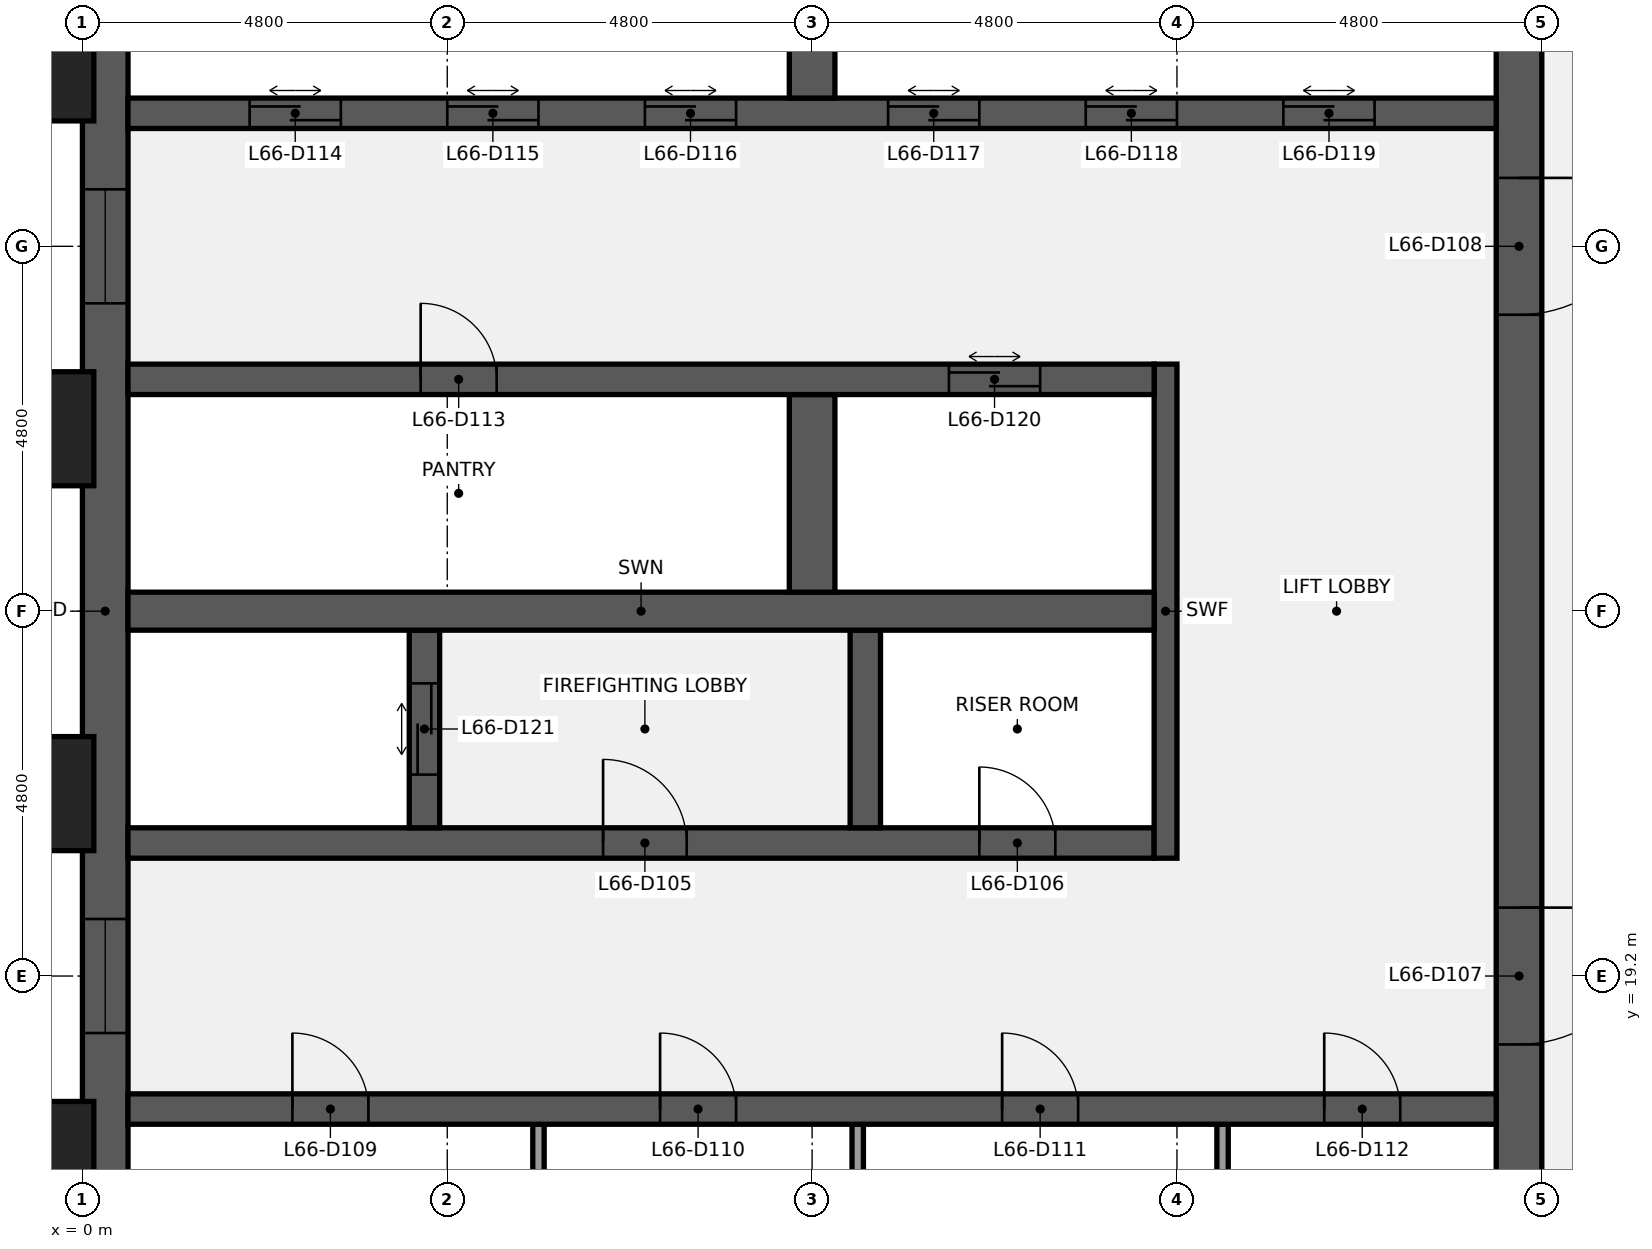
"""IFC4 building model, lengths in metres.
Left out: names, types, materials, properties, quantities, classifications, styles, units other than length and angle.
Written with IfcOpenShell. Run it as: python <this file> out.ifc"""

import sys

from ifc_helpers import new_model, si_unit, direction, frame, frame_2d, origin, origin_2d, place, context, subcontext, project, spatial, rectangle, extrude, element, fill, save


model = new_model("IFC4")
c1 = context("Model", 3, precision=1e-05, world=origin(), true_north=direction((0.0, 1.0)))
c2 = subcontext(c1, "Body", "Model", "MODEL_VIEW")
j1 = project(units=[si_unit("LENGTHUNIT", "METRE"), si_unit("PLANEANGLEUNIT", "RADIAN")], contexts=[c1])
p1 = place(None, origin())
s1 = spatial("IfcSite", under=j1, at=p1, CompositionType="ELEMENT")
p2 = place(p1, origin())
s2 = spatial("IfcBuilding", under=s1, at=p2, CompositionType="ELEMENT")
p3 = place(p2, frame((0.0, 0.0, 302.3)))
s3 = spatial("IfcBuildingStorey", under=s2, at=p3, CompositionType="ELEMENT", Elevation=302.3)
p4 = place(p3, frame((0.3, 9.6, 0.0), z_axis=(0.0, 0.0, 1.0), x_axis=(0.0, 1.0, 0.0)))
e1 = element("IfcWall", 1, at=p4, inside=s3, PredefinedType="SHEAR", context=c2, shape_type="SweptSolid", body=[
    extrude(rectangle(XDim=28.8, YDim=0.6, at=frame_2d((14.4, 0.0))), origin(), (0.0, 0.0, 1.0), 3.84),
])
p5 = place(p4, frame((8.85, 0.0, 0.9)))
e2 = element("IfcOpeningElement", 2, at=p5, cuts=e1, PredefinedType="OPENING", context=c2, shape_type="SweptSolid", body=[
    extrude(rectangle(XDim=1.5, YDim=1.5, at=frame_2d((0.75, 0.75))), frame((0.0, 0.31, 0.0), z_axis=(0.0, -1.0, 0.0), x_axis=(1.0, 0.0, 0.0)), (0.0, 0.0, 1.0), 0.62),
])
p6 = place(p4, frame((18.45, 0.0, 0.9)))
e3 = element("IfcOpeningElement", 3, at=p6, cuts=e1, PredefinedType="OPENING", context=c2, shape_type="SweptSolid", body=[
    extrude(rectangle(XDim=1.5, YDim=1.5, at=frame_2d((0.75, 0.75))), frame((0.0, 0.31, 0.0), z_axis=(0.0, -1.0, 0.0), x_axis=(1.0, 0.0, 0.0)), (0.0, 0.0, 1.0), 0.62),
])
p7 = place(p3, frame((18.9, 38.4, 0.0), z_axis=(0.0, 0.0, 1.0), x_axis=(0.0, -1.0, 0.0)))
e4 = element("IfcWall", 4, at=p7, inside=s3, PredefinedType="SHEAR", context=c2, shape_type="SweptSolid", body=[
    extrude(rectangle(XDim=28.8, YDim=0.6, at=frame_2d((14.4, 0.0))), origin(), (0.0, 0.0, 1.0), 3.84),
])
p8 = place(p7, frame((18.3, 0.0, 0.0)))
e5 = element("IfcOpeningElement", 5, at=p8, cuts=e4, PredefinedType="OPENING", context=c2, shape_type="SweptSolid", body=[
    extrude(rectangle(XDim=1.8, YDim=2.1, at=frame_2d((0.9, 1.05))), frame((0.0, 0.31, 0.0), z_axis=(0.0, -1.0, 0.0), x_axis=(1.0, 0.0, 0.0)), (0.0, 0.0, 1.0), 0.62),
])
p9 = place(p7, frame((8.7, 0.0, 0.0)))
e6 = element("IfcOpeningElement", 6, at=p9, cuts=e4, PredefinedType="OPENING", context=c2, shape_type="SweptSolid", body=[
    extrude(rectangle(XDim=1.8, YDim=2.1, at=frame_2d((0.9, 1.05))), frame((0.0, 0.31, 0.0), z_axis=(0.0, -1.0, 0.0), x_axis=(1.0, 0.0, 0.0)), (0.0, 0.0, 1.0), 0.62),
])
for number, where, z_axis, x_axis in (
    (7, (6.0, 14.65, 0.0), (0.0, 0.0, 1.0), (0.0, 1.0, 0.0)),
    (8, (10.2, 14.65, 0.0), (0.0, 0.0, 1.0), (0.0, 1.0, 0.0)),
    (9, (15.0, 14.65, 0.0), (0.0, 0.0, 1.0), (0.0, 1.0, 0.0)),
):
    element("IfcWall", number, at=place(p3, frame(where, z_axis=z_axis, x_axis=x_axis)), inside=s3, PredefinedType="PARTITIONING", context=c2, shape_type="SweptSolid", body=[
        extrude(rectangle(XDim=2.6, YDim=0.15, at=frame_2d((1.3, 0.0))), origin(), (0.0, 0.0, 1.0), 3.84),
    ])
p10 = place(p3, frame((0.6, 17.45, 0.0), z_axis=(0.0, 0.0, 1.0), x_axis=(1.0, 0.0, 0.0)))
e10 = element("IfcWall", 10, at=p10, inside=s3, PredefinedType="SHEAR", context=c2, shape_type="SweptSolid", body=[
    extrude(rectangle(XDim=18.0, YDim=0.4, at=frame_2d((9.0, 0.0))), origin(), (0.0, 0.0, 1.0), 3.84),
])
p11 = place(p10, frame((2.163, 0.0, 0.0)))
e11 = element("IfcOpeningElement", 11, at=p11, cuts=e10, PredefinedType="OPENING", context=c2, shape_type="SweptSolid", body=[
    extrude(rectangle(XDim=1.0, YDim=2.1, at=frame_2d((0.5, 1.05))), frame((0.0, 0.21, 0.0), z_axis=(0.0, -1.0, 0.0), x_axis=(1.0, 0.0, 0.0)), (0.0, 0.0, 1.0), 0.42),
])
p12 = place(p10, frame((7.0, 0.0, 0.0)))
e12 = element("IfcOpeningElement", 12, at=p12, cuts=e10, PredefinedType="OPENING", context=c2, shape_type="SweptSolid", body=[
    extrude(rectangle(XDim=1.0, YDim=2.1, at=frame_2d((0.5, 1.05))), frame((0.0, 0.21, 0.0), z_axis=(0.0, -1.0, 0.0), x_axis=(1.0, 0.0, 0.0)), (0.0, 0.0, 1.0), 0.42),
])
p13 = place(p10, frame((11.5, 0.0, 0.0)))
e13 = element("IfcOpeningElement", 13, at=p13, cuts=e10, PredefinedType="OPENING", context=c2, shape_type="SweptSolid", body=[
    extrude(rectangle(XDim=1.0, YDim=2.1, at=frame_2d((0.5, 1.05))), frame((0.0, 0.21, 0.0), z_axis=(0.0, -1.0, 0.0), x_axis=(1.0, 0.0, 0.0)), (0.0, 0.0, 1.0), 0.42),
])
p14 = place(p10, frame((15.738, 0.0, 0.0)))
e14 = element("IfcOpeningElement", 14, at=p14, cuts=e10, PredefinedType="OPENING", context=c2, shape_type="SweptSolid", body=[
    extrude(rectangle(XDim=1.0, YDim=2.1, at=frame_2d((0.5, 1.05))), frame((0.0, 0.21, 0.0), z_axis=(0.0, -1.0, 0.0), x_axis=(1.0, 0.0, 0.0)), (0.0, 0.0, 1.0), 0.42),
])
p15 = place(p3, frame((0.6, 20.95, 0.0), z_axis=(0.0, 0.0, 1.0), x_axis=(1.0, 0.0, 0.0)))
e15 = element("IfcWall", 15, at=p15, inside=s3, PredefinedType="SHEAR", context=c2, shape_type="SweptSolid", body=[
    extrude(rectangle(XDim=13.5, YDim=0.4, at=frame_2d((6.75, 0.0))), origin(), (0.0, 0.0, 1.0), 3.84),
])
p16 = place(p15, frame((6.25, 0.0, 0.0)))
e16 = element("IfcOpeningElement", 16, at=p16, cuts=e15, PredefinedType="OPENING", context=c2, shape_type="SweptSolid", body=[
    extrude(rectangle(XDim=1.1, YDim=2.1, at=frame_2d((0.55, 1.05))), frame((0.0, 0.21, 0.0), z_axis=(0.0, -1.0, 0.0), x_axis=(1.0, 0.0, 0.0)), (0.0, 0.0, 1.0), 0.42),
])
p17 = place(p15, frame((11.2, 0.0, 0.0)))
e17 = element("IfcOpeningElement", 17, at=p17, cuts=e15, PredefinedType="OPENING", context=c2, shape_type="SweptSolid", body=[
    extrude(rectangle(XDim=1.0, YDim=2.1, at=frame_2d((0.5, 1.05))), frame((0.0, 0.21, 0.0), z_axis=(0.0, -1.0, 0.0), x_axis=(1.0, 0.0, 0.0)), (0.0, 0.0, 1.0), 0.42),
])
p18 = place(p3, frame((14.25, 20.75, 0.0), z_axis=(0.0, 0.0, 1.0), x_axis=(0.0, 1.0, 0.0)))
e18 = element("IfcWall", 18, at=p18, inside=s3, PredefinedType="SHEAR", context=c2, shape_type="SweptSolid", body=[
    extrude(rectangle(XDim=6.5, YDim=0.3, at=frame_2d((3.25, 0.0))), origin(), (0.0, 0.0, 1.0), 3.84),
])
p19 = place(p3, frame((4.5, 21.15, 0.0), z_axis=(0.0, 0.0, 1.0), x_axis=(0.0, 1.0, 0.0)))
e19 = element("IfcWall", 19, at=p19, inside=s3, PredefinedType="SHEAR", context=c2, shape_type="SweptSolid", body=[
    extrude(rectangle(XDim=2.6, YDim=0.4, at=frame_2d((1.3, 0.0))), origin(), (0.0, 0.0, 1.0), 3.84),
])
p20 = place(p19, frame((0.7, 0.0, 0.0)))
e20 = element("IfcOpeningElement", 20, at=p20, cuts=e19, PredefinedType="OPENING", context=c2, shape_type="SweptSolid", body=[
    extrude(rectangle(XDim=1.2, YDim=2.1, at=frame_2d((0.6, 1.05))), frame((0.0, 0.21, 0.0), z_axis=(0.0, -1.0, 0.0), x_axis=(1.0, 0.0, 0.0)), (0.0, 0.0, 1.0), 0.42),
])
p21 = place(p3, frame((10.3, 21.15, 0.0), z_axis=(0.0, 0.0, 1.0), x_axis=(0.0, 1.0, 0.0)))
e21 = element("IfcWall", 21, at=p21, inside=s3, PredefinedType="SHEAR", context=c2, shape_type="SweptSolid", body=[
    extrude(rectangle(XDim=2.6, YDim=0.4, at=frame_2d((1.3, 0.0))), origin(), (0.0, 0.0, 1.0), 3.84),
])
p22 = place(p3, frame((0.6, 24.0, 0.0), z_axis=(0.0, 0.0, 1.0), x_axis=(1.0, 0.0, 0.0)))
e22 = element("IfcWall", 22, at=p22, inside=s3, PredefinedType="SHEAR", context=c2, shape_type="SweptSolid", body=[
    extrude(rectangle(XDim=13.5, YDim=0.5, at=frame_2d((6.75, 0.0))), origin(), (0.0, 0.0, 1.0), 3.84),
])
p23 = place(p3, frame((9.6, 24.25, 0.0), z_axis=(0.0, 0.0, 1.0), x_axis=(0.0, 1.0, 0.0)))
e23 = element("IfcWall", 23, at=p23, inside=s3, PredefinedType="SHEAR", context=c2, shape_type="SweptSolid", body=[
    extrude(rectangle(XDim=2.6, YDim=0.6, at=frame_2d((1.3, 0.0))), origin(), (0.0, 0.0, 1.0), 3.84),
])
p24 = place(p3, frame((0.6, 27.05, 0.0), z_axis=(0.0, 0.0, 1.0), x_axis=(1.0, 0.0, 0.0)))
e24 = element("IfcWall", 24, at=p24, inside=s3, PredefinedType="SHEAR", context=c2, shape_type="SweptSolid", body=[
    extrude(rectangle(XDim=13.5, YDim=0.4, at=frame_2d((6.75, 0.0))), origin(), (0.0, 0.0, 1.0), 3.84),
])
p25 = place(p24, frame((3.85, 0.0, 0.0)))
e25 = element("IfcOpeningElement", 25, at=p25, cuts=e24, PredefinedType="OPENING", context=c2, shape_type="SweptSolid", body=[
    extrude(rectangle(XDim=1.0, YDim=2.1, at=frame_2d((0.5, 1.05))), frame((0.0, 0.21, 0.0), z_axis=(0.0, -1.0, 0.0), x_axis=(1.0, 0.0, 0.0)), (0.0, 0.0, 1.0), 0.42),
])
p26 = place(p24, frame((10.8, 0.0, 0.0)))
e26 = element("IfcOpeningElement", 26, at=p26, cuts=e24, PredefinedType="OPENING", context=c2, shape_type="SweptSolid", body=[
    extrude(rectangle(XDim=1.2, YDim=2.1, at=frame_2d((0.6, 1.05))), frame((0.0, 0.21, 0.0), z_axis=(0.0, -1.0, 0.0), x_axis=(1.0, 0.0, 0.0)), (0.0, 0.0, 1.0), 0.42),
])
p27 = place(p3, frame((0.6, 30.55, 0.0), z_axis=(0.0, 0.0, 1.0), x_axis=(1.0, 0.0, 0.0)))
e27 = element("IfcWall", 27, at=p27, inside=s3, PredefinedType="SHEAR", context=c2, shape_type="SweptSolid", body=[
    extrude(rectangle(XDim=18.0, YDim=0.4, at=frame_2d((9.0, 0.0))), origin(), (0.0, 0.0, 1.0), 3.84),
])
p28 = place(p27, frame((1.6, 0.0, 0.0)))
e28 = element("IfcOpeningElement", 28, at=p28, cuts=e27, PredefinedType="OPENING", context=c2, shape_type="SweptSolid", body=[
    extrude(rectangle(XDim=1.2, YDim=2.1, at=frame_2d((0.6, 1.05))), frame((0.0, 0.21, 0.0), z_axis=(0.0, -1.0, 0.0), x_axis=(1.0, 0.0, 0.0)), (0.0, 0.0, 1.0), 0.42),
])
p29 = place(p27, frame((4.2, 0.0, 0.0)))
e29 = element("IfcOpeningElement", 29, at=p29, cuts=e27, PredefinedType="OPENING", context=c2, shape_type="SweptSolid", body=[
    extrude(rectangle(XDim=1.2, YDim=2.1, at=frame_2d((0.6, 1.05))), frame((0.0, 0.21, 0.0), z_axis=(0.0, -1.0, 0.0), x_axis=(1.0, 0.0, 0.0)), (0.0, 0.0, 1.0), 0.42),
])
p30 = place(p27, frame((6.8, 0.0, 0.0)))
e30 = element("IfcOpeningElement", 30, at=p30, cuts=e27, PredefinedType="OPENING", context=c2, shape_type="SweptSolid", body=[
    extrude(rectangle(XDim=1.2, YDim=2.1, at=frame_2d((0.6, 1.05))), frame((0.0, 0.21, 0.0), z_axis=(0.0, -1.0, 0.0), x_axis=(1.0, 0.0, 0.0)), (0.0, 0.0, 1.0), 0.42),
])
p31 = place(p27, frame((10.0, 0.0, 0.0)))
e31 = element("IfcOpeningElement", 31, at=p31, cuts=e27, PredefinedType="OPENING", context=c2, shape_type="SweptSolid", body=[
    extrude(rectangle(XDim=1.2, YDim=2.1, at=frame_2d((0.6, 1.05))), frame((0.0, 0.21, 0.0), z_axis=(0.0, -1.0, 0.0), x_axis=(1.0, 0.0, 0.0)), (0.0, 0.0, 1.0), 0.42),
])
p32 = place(p27, frame((12.6, 0.0, 0.0)))
e32 = element("IfcOpeningElement", 32, at=p32, cuts=e27, PredefinedType="OPENING", context=c2, shape_type="SweptSolid", body=[
    extrude(rectangle(XDim=1.2, YDim=2.1, at=frame_2d((0.6, 1.05))), frame((0.0, 0.21, 0.0), z_axis=(0.0, -1.0, 0.0), x_axis=(1.0, 0.0, 0.0)), (0.0, 0.0, 1.0), 0.42),
])
p33 = place(p27, frame((15.2, 0.0, 0.0)))
e33 = element("IfcOpeningElement", 33, at=p33, cuts=e27, PredefinedType="OPENING", context=c2, shape_type="SweptSolid", body=[
    extrude(rectangle(XDim=1.2, YDim=2.1, at=frame_2d((0.6, 1.05))), frame((0.0, 0.21, 0.0), z_axis=(0.0, -1.0, 0.0), x_axis=(1.0, 0.0, 0.0)), (0.0, 0.0, 1.0), 0.42),
])
p34 = place(p3, frame((9.6, 30.75, 0.0), z_axis=(0.0, 0.0, 1.0), x_axis=(0.0, 1.0, 0.0)))
e34 = element("IfcWall", 34, at=p34, inside=s3, PredefinedType="SHEAR", context=c2, shape_type="SweptSolid", body=[
    extrude(rectangle(XDim=2.6, YDim=0.6, at=frame_2d((1.3, 0.0))), origin(), (0.0, 0.0, 1.0), 3.84),
])
for number, where, z_axis, x_axis in (
    (35, (-0.75, 16.8, 0.0), (0.0, 0.0, 1.0), (0.0, 1.0, 0.0)),
    (36, (-0.75, 21.6, 0.0), (0.0, 0.0, 1.0), (0.0, 1.0, 0.0)),
    (37, (-0.75, 26.4, 0.0), (0.0, 0.0, 1.0), (0.0, 1.0, 0.0)),
    (38, (-0.75, 31.2, 0.0), (0.0, 0.0, 1.0), (0.0, 1.0, 0.0)),
):
    element("IfcColumn", number, at=place(p3, frame(where, z_axis=z_axis, x_axis=x_axis)), inside=s3, PredefinedType="PILASTER", context=c2, shape_type="SweptSolid", body=[
        extrude(rectangle(XDim=1.8, YDim=1.5, at=origin_2d()), origin(), (0.0, 0.0, 1.0), 4.0),
    ])
p35 = place(p16, origin())
e39 = element("IfcDoor", 39, at=p35, inside=s3, OperationType="SINGLE_SWING_LEFT", PredefinedType="DOOR", context=c2, shape_type="SweptSolid", body=[
    extrude(rectangle(XDim=1.1, YDim=2.1, at=frame_2d((0.55, 1.05))), frame((0.0, 0.025, 0.0), z_axis=(0.0, -1.0, 0.0), x_axis=(1.0, 0.0, 0.0)), (0.0, 0.0, 1.0), 0.05),
])
fill(e16, e39)
p36 = place(p17, origin())
e40 = element("IfcDoor", 40, at=p36, inside=s3, OperationType="SINGLE_SWING_LEFT", PredefinedType="DOOR", context=c2, shape_type="SweptSolid", body=[
    extrude(rectangle(XDim=1.0, YDim=2.1, at=frame_2d((0.5, 1.05))), frame((0.0, 0.025, 0.0), z_axis=(0.0, -1.0, 0.0), x_axis=(1.0, 0.0, 0.0)), (0.0, 0.0, 1.0), 0.05),
])
fill(e17, e40)
p37 = place(p8, origin())
e41 = element("IfcDoor", 41, at=p37, inside=s3, OperationType="DOUBLE_DOOR_SINGLE_SWING", PredefinedType="DOOR", context=c2, shape_type="SweptSolid", body=[
    extrude(rectangle(XDim=1.8, YDim=2.1, at=frame_2d((0.9, 1.05))), frame((0.0, 0.025, 0.0), z_axis=(0.0, -1.0, 0.0), x_axis=(1.0, 0.0, 0.0)), (0.0, 0.0, 1.0), 0.05),
])
fill(e5, e41)
p38 = place(p9, origin())
e42 = element("IfcDoor", 42, at=p38, inside=s3, OperationType="DOUBLE_DOOR_SINGLE_SWING", PredefinedType="DOOR", context=c2, shape_type="SweptSolid", body=[
    extrude(rectangle(XDim=1.8, YDim=2.1, at=frame_2d((0.9, 1.05))), frame((0.0, 0.025, 0.0), z_axis=(0.0, -1.0, 0.0), x_axis=(1.0, 0.0, 0.0)), (0.0, 0.0, 1.0), 0.05),
])
fill(e6, e42)
p39 = place(p11, origin())
e43 = element("IfcDoor", 43, at=p39, inside=s3, OperationType="SINGLE_SWING_LEFT", PredefinedType="DOOR", context=c2, shape_type="SweptSolid", body=[
    extrude(rectangle(XDim=1.0, YDim=2.1, at=frame_2d((0.5, 1.05))), frame((0.0, 0.025, 0.0), z_axis=(0.0, -1.0, 0.0), x_axis=(1.0, 0.0, 0.0)), (0.0, 0.0, 1.0), 0.05),
])
fill(e11, e43)
p40 = place(p12, origin())
e44 = element("IfcDoor", 44, at=p40, inside=s3, OperationType="SINGLE_SWING_LEFT", PredefinedType="DOOR", context=c2, shape_type="SweptSolid", body=[
    extrude(rectangle(XDim=1.0, YDim=2.1, at=frame_2d((0.5, 1.05))), frame((0.0, 0.025, 0.0), z_axis=(0.0, -1.0, 0.0), x_axis=(1.0, 0.0, 0.0)), (0.0, 0.0, 1.0), 0.05),
])
fill(e12, e44)
p41 = place(p13, origin())
e45 = element("IfcDoor", 45, at=p41, inside=s3, OperationType="SINGLE_SWING_LEFT", PredefinedType="DOOR", context=c2, shape_type="SweptSolid", body=[
    extrude(rectangle(XDim=1.0, YDim=2.1, at=frame_2d((0.5, 1.05))), frame((0.0, 0.025, 0.0), z_axis=(0.0, -1.0, 0.0), x_axis=(1.0, 0.0, 0.0)), (0.0, 0.0, 1.0), 0.05),
])
fill(e13, e45)
p42 = place(p14, origin())
e46 = element("IfcDoor", 46, at=p42, inside=s3, OperationType="SINGLE_SWING_LEFT", PredefinedType="DOOR", context=c2, shape_type="SweptSolid", body=[
    extrude(rectangle(XDim=1.0, YDim=2.1, at=frame_2d((0.5, 1.05))), frame((0.0, 0.025, 0.0), z_axis=(0.0, -1.0, 0.0), x_axis=(1.0, 0.0, 0.0)), (0.0, 0.0, 1.0), 0.05),
])
fill(e14, e46)
p43 = place(p25, origin())
e47 = element("IfcDoor", 47, at=p43, inside=s3, OperationType="SINGLE_SWING_LEFT", PredefinedType="DOOR", context=c2, shape_type="SweptSolid", body=[
    extrude(rectangle(XDim=1.0, YDim=2.1, at=frame_2d((0.5, 1.05))), frame((0.0, 0.025, 0.0), z_axis=(0.0, -1.0, 0.0), x_axis=(1.0, 0.0, 0.0)), (0.0, 0.0, 1.0), 0.05),
])
fill(e25, e47)
p44 = place(p28, origin())
e48 = element("IfcDoor", 48, at=p44, inside=s3, OperationType="DOUBLE_DOOR_SLIDING", PredefinedType="DOOR", context=c2, shape_type="SweptSolid", body=[
    extrude(rectangle(XDim=1.2, YDim=2.1, at=frame_2d((0.6, 1.05))), frame((0.0, 0.025, 0.0), z_axis=(0.0, -1.0, 0.0), x_axis=(1.0, 0.0, 0.0)), (0.0, 0.0, 1.0), 0.05),
])
fill(e28, e48)
p45 = place(p29, origin())
e49 = element("IfcDoor", 49, at=p45, inside=s3, OperationType="DOUBLE_DOOR_SLIDING", PredefinedType="DOOR", context=c2, shape_type="SweptSolid", body=[
    extrude(rectangle(XDim=1.2, YDim=2.1, at=frame_2d((0.6, 1.05))), frame((0.0, 0.025, 0.0), z_axis=(0.0, -1.0, 0.0), x_axis=(1.0, 0.0, 0.0)), (0.0, 0.0, 1.0), 0.05),
])
fill(e29, e49)
p46 = place(p30, origin())
e50 = element("IfcDoor", 50, at=p46, inside=s3, OperationType="DOUBLE_DOOR_SLIDING", PredefinedType="DOOR", context=c2, shape_type="SweptSolid", body=[
    extrude(rectangle(XDim=1.2, YDim=2.1, at=frame_2d((0.6, 1.05))), frame((0.0, 0.025, 0.0), z_axis=(0.0, -1.0, 0.0), x_axis=(1.0, 0.0, 0.0)), (0.0, 0.0, 1.0), 0.05),
])
fill(e30, e50)
p47 = place(p31, origin())
e51 = element("IfcDoor", 51, at=p47, inside=s3, OperationType="DOUBLE_DOOR_SLIDING", PredefinedType="DOOR", context=c2, shape_type="SweptSolid", body=[
    extrude(rectangle(XDim=1.2, YDim=2.1, at=frame_2d((0.6, 1.05))), frame((0.0, 0.025, 0.0), z_axis=(0.0, -1.0, 0.0), x_axis=(1.0, 0.0, 0.0)), (0.0, 0.0, 1.0), 0.05),
])
fill(e31, e51)
p48 = place(p32, origin())
e52 = element("IfcDoor", 52, at=p48, inside=s3, OperationType="DOUBLE_DOOR_SLIDING", PredefinedType="DOOR", context=c2, shape_type="SweptSolid", body=[
    extrude(rectangle(XDim=1.2, YDim=2.1, at=frame_2d((0.6, 1.05))), frame((0.0, 0.025, 0.0), z_axis=(0.0, -1.0, 0.0), x_axis=(1.0, 0.0, 0.0)), (0.0, 0.0, 1.0), 0.05),
])
fill(e32, e52)
p49 = place(p33, origin())
e53 = element("IfcDoor", 53, at=p49, inside=s3, OperationType="DOUBLE_DOOR_SLIDING", PredefinedType="DOOR", context=c2, shape_type="SweptSolid", body=[
    extrude(rectangle(XDim=1.2, YDim=2.1, at=frame_2d((0.6, 1.05))), frame((0.0, 0.025, 0.0), z_axis=(0.0, -1.0, 0.0), x_axis=(1.0, 0.0, 0.0)), (0.0, 0.0, 1.0), 0.05),
])
fill(e33, e53)
p50 = place(p26, origin())
e54 = element("IfcDoor", 54, at=p50, inside=s3, OperationType="DOUBLE_DOOR_SLIDING", PredefinedType="DOOR", context=c2, shape_type="SweptSolid", body=[
    extrude(rectangle(XDim=1.2, YDim=2.1, at=frame_2d((0.6, 1.05))), frame((0.0, 0.025, 0.0), z_axis=(0.0, -1.0, 0.0), x_axis=(1.0, 0.0, 0.0)), (0.0, 0.0, 1.0), 0.05),
])
fill(e26, e54)
p51 = place(p20, origin())
e55 = element("IfcDoor", 55, at=p51, inside=s3, OperationType="DOUBLE_DOOR_SLIDING", PredefinedType="DOOR", context=c2, shape_type="SweptSolid", body=[
    extrude(rectangle(XDim=1.2, YDim=2.1, at=frame_2d((0.6, 1.05))), frame((0.0, 0.025, 0.0), z_axis=(0.0, -1.0, 0.0), x_axis=(1.0, 0.0, 0.0)), (0.0, 0.0, 1.0), 0.05),
])
fill(e20, e55)
p52 = place(p5, origin())
e56 = element("IfcWindow", 56, at=p52, inside=s3, PartitioningType="SINGLE_PANEL", PredefinedType="WINDOW", context=c2, shape_type="SweptSolid", body=[
    extrude(rectangle(XDim=1.5, YDim=1.5, at=frame_2d((0.75, 0.75))), frame((0.0, 0.03, 0.0), z_axis=(0.0, -1.0, 0.0), x_axis=(1.0, 0.0, 0.0)), (0.0, 0.0, 1.0), 0.06),
])
fill(e2, e56)
p53 = place(p6, origin())
e57 = element("IfcWindow", 57, at=p53, inside=s3, PartitioningType="SINGLE_PANEL", PredefinedType="WINDOW", context=c2, shape_type="SweptSolid", body=[
    extrude(rectangle(XDim=1.5, YDim=1.5, at=frame_2d((0.75, 0.75))), frame((0.0, 0.03, 0.0), z_axis=(0.0, -1.0, 0.0), x_axis=(1.0, 0.0, 0.0)), (0.0, 0.0, 1.0), 0.06),
])
fill(e3, e57)
save(model, sys.argv[1])
